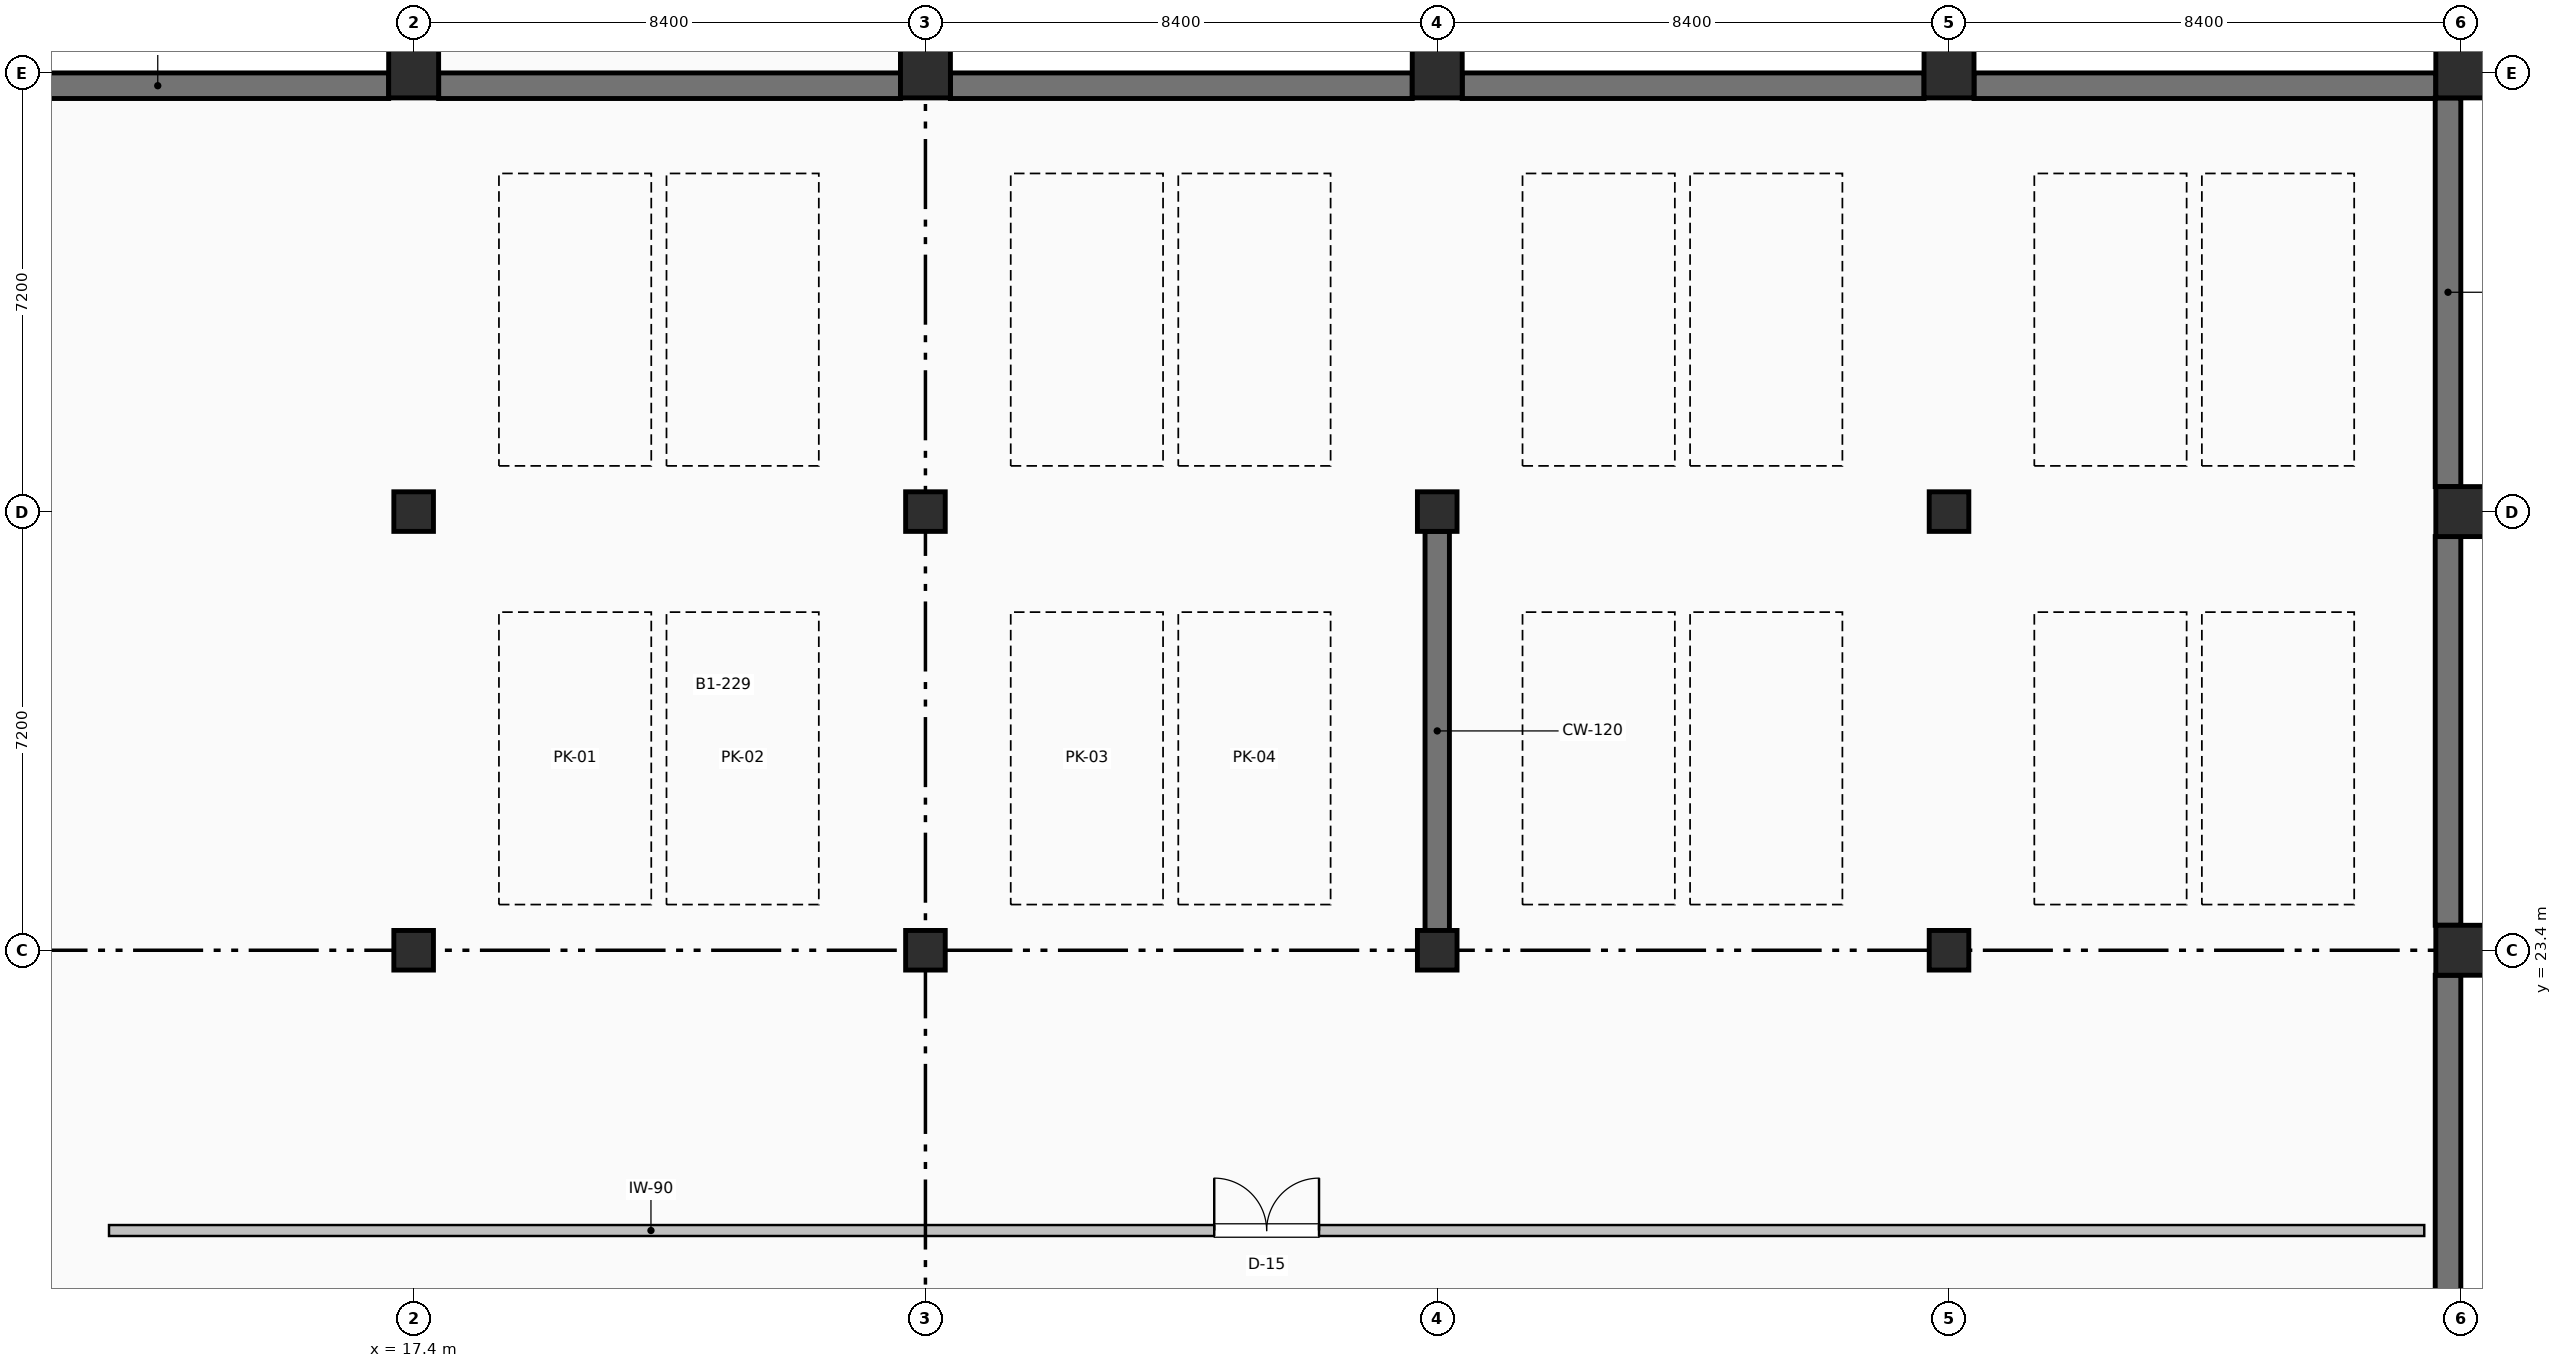
"""IFC4 building model, lengths in metres.
Left out: names, types, materials, properties, quantities, classifications, styles, units other than length and angle.
Written with IfcOpenShell. Run it as: python <this file> out.ifc"""

import sys

from ifc_helpers import new_model, si_unit, direction, frame, frame_2d, origin, origin_2d, place, context, subcontext, project, spatial, rectangle, extrude, element, fill, save


model = new_model("IFC4")
c1 = context("Model", 3, precision=1e-05, world=origin(), true_north=direction((0.0, 1.0)))
c2 = subcontext(c1, "Body", "Model", "MODEL_VIEW")
j1 = project(units=[si_unit("LENGTHUNIT", "METRE"), si_unit("PLANEANGLEUNIT", "RADIAN")], contexts=[c1])
p1 = place(None, origin())
s1 = spatial("IfcSite", under=j1, at=p1, CompositionType="ELEMENT")
p2 = place(p1, origin())
s2 = spatial("IfcBuilding", under=s1, at=p2, CompositionType="ELEMENT")
p3 = place(p2, frame((0.0, 0.0, -4.8)))
s3 = spatial("IfcBuildingStorey", under=s2, at=p3, CompositionType="ELEMENT", Elevation=-4.8)
for number, where, z_axis, x_axis in (
    (1, (17.4, 23.4, 0.0), (0.0, 0.0, 1.0), (1.0, 0.0, 0.0)),
    (2, (17.4, 30.6, 0.0), (0.0, 0.0, 1.0), (1.0, 0.0, 0.0)),
):
    element("IfcColumn", number, at=place(p3, frame(where, z_axis=z_axis, x_axis=x_axis)), inside=s3, PredefinedType="COLUMN", context=c2, shape_type="SweptSolid", body=[
        extrude(rectangle(XDim=0.65, YDim=0.65, at=origin_2d()), origin(), (0.0, 0.0, 1.0), 4.8),
    ])
p4 = place(p3, frame((17.4, 37.8, 0.0), z_axis=(0.0, 0.0, 1.0), x_axis=(1.0, 0.0, 0.0)))
e3 = element("IfcColumn", 3, at=p4, inside=s3, PredefinedType="COLUMN", context=c2, shape_type="SweptSolid", body=[
    extrude(rectangle(XDim=0.82, YDim=0.82, at=origin_2d()), origin(), (0.0, 0.0, 1.0), 4.8),
])
for number, where, z_axis, x_axis in (
    (4, (25.8, 23.4, 0.0), (0.0, 0.0, 1.0), (1.0, 0.0, 0.0)),
    (5, (25.8, 30.6, 0.0), (0.0, 0.0, 1.0), (1.0, 0.0, 0.0)),
):
    element("IfcColumn", number, at=place(p3, frame(where, z_axis=z_axis, x_axis=x_axis)), inside=s3, PredefinedType="COLUMN", context=c2, shape_type="SweptSolid", body=[
        extrude(rectangle(XDim=0.65, YDim=0.65, at=origin_2d()), origin(), (0.0, 0.0, 1.0), 4.8),
    ])
p5 = place(p3, frame((25.8, 37.8, 0.0), z_axis=(0.0, 0.0, 1.0), x_axis=(1.0, 0.0, 0.0)))
e6 = element("IfcColumn", 6, at=p5, inside=s3, PredefinedType="COLUMN", context=c2, shape_type="SweptSolid", body=[
    extrude(rectangle(XDim=0.82, YDim=0.82, at=origin_2d()), origin(), (0.0, 0.0, 1.0), 4.8),
])
for number, where, z_axis, x_axis in (
    (7, (34.2, 23.4, 0.0), (0.0, 0.0, 1.0), (1.0, 0.0, 0.0)),
    (8, (34.2, 30.6, 0.0), (0.0, 0.0, 1.0), (1.0, 0.0, 0.0)),
):
    element("IfcColumn", number, at=place(p3, frame(where, z_axis=z_axis, x_axis=x_axis)), inside=s3, PredefinedType="COLUMN", context=c2, shape_type="SweptSolid", body=[
        extrude(rectangle(XDim=0.65, YDim=0.65, at=origin_2d()), origin(), (0.0, 0.0, 1.0), 4.8),
    ])
p6 = place(p3, frame((34.2, 37.8, 0.0), z_axis=(0.0, 0.0, 1.0), x_axis=(1.0, 0.0, 0.0)))
e9 = element("IfcColumn", 9, at=p6, inside=s3, PredefinedType="COLUMN", context=c2, shape_type="SweptSolid", body=[
    extrude(rectangle(XDim=0.82, YDim=0.82, at=origin_2d()), origin(), (0.0, 0.0, 1.0), 4.8),
])
for number, where, z_axis, x_axis in (
    (10, (42.6, 23.4, 0.0), (0.0, 0.0, 1.0), (1.0, 0.0, 0.0)),
    (11, (42.6, 30.6, 0.0), (0.0, 0.0, 1.0), (1.0, 0.0, 0.0)),
):
    element("IfcColumn", number, at=place(p3, frame(where, z_axis=z_axis, x_axis=x_axis)), inside=s3, PredefinedType="COLUMN", context=c2, shape_type="SweptSolid", body=[
        extrude(rectangle(XDim=0.65, YDim=0.65, at=origin_2d()), origin(), (0.0, 0.0, 1.0), 4.8),
    ])
for number, where, z_axis, x_axis in (
    (12, (42.6, 37.8, 0.0), (0.0, 0.0, 1.0), (1.0, 0.0, 0.0)),
    (13, (51.0, 23.4, 0.0), (0.0, 0.0, 1.0), (1.0, 0.0, 0.0)),
    (14, (51.0, 30.6, 0.0), (0.0, 0.0, 1.0), (1.0, 0.0, 0.0)),
    (15, (51.0, 37.8, 0.0), (0.0, 0.0, 1.0), (1.0, 0.0, 0.0)),
):
    element("IfcColumn", number, at=place(p3, frame(where, z_axis=z_axis, x_axis=x_axis)), inside=s3, PredefinedType="COLUMN", context=c2, shape_type="SweptSolid", body=[
        extrude(rectangle(XDim=0.82, YDim=0.82, at=origin_2d()), origin(), (0.0, 0.0, 1.0), 4.8),
    ])
p7 = place(p3, frame((34.2, 23.725, 0.0), z_axis=(0.0, 0.0, 1.0), x_axis=(0.0, 1.0, 0.0)))
e16 = element("IfcWall", 16, at=p7, inside=s3, PredefinedType="SHEAR", context=c2, shape_type="SweptSolid", body=[
    extrude(rectangle(XDim=6.55, YDim=0.4, at=frame_2d((3.275, 0.0))), origin(), (0.0, 0.0, 1.0), 4.48),
])
p8 = place(p3, frame((9.41, 37.59, 0.0), z_axis=(0.0, 0.0, 1.0), x_axis=(1.0, 0.0, 0.0)))
e17 = element("IfcWall", 17, at=p8, inside=s3, PredefinedType="SHEAR", context=c2, shape_type="SweptSolid", body=[
    extrude(rectangle(XDim=7.58, YDim=0.42, at=frame_2d((3.79, 0.0))), origin(), (0.0, 0.0, 1.0), 4.5),
])
p9 = place(p3, frame((17.81, 37.59, 0.0), z_axis=(0.0, 0.0, 1.0), x_axis=(1.0, 0.0, 0.0)))
e18 = element("IfcWall", 18, at=p9, inside=s3, PredefinedType="SHEAR", context=c2, shape_type="SweptSolid", body=[
    extrude(rectangle(XDim=7.58, YDim=0.42, at=frame_2d((3.79, 0.0))), origin(), (0.0, 0.0, 1.0), 4.5),
])
p10 = place(p3, frame((26.21, 37.59, 0.0), z_axis=(0.0, 0.0, 1.0), x_axis=(1.0, 0.0, 0.0)))
e19 = element("IfcWall", 19, at=p10, inside=s3, PredefinedType="SHEAR", context=c2, shape_type="SweptSolid", body=[
    extrude(rectangle(XDim=7.58, YDim=0.42, at=frame_2d((3.79, 0.0))), origin(), (0.0, 0.0, 1.0), 4.5),
])
p11 = place(p3, frame((34.61, 37.59, 0.0), z_axis=(0.0, 0.0, 1.0), x_axis=(1.0, 0.0, 0.0)))
e20 = element("IfcWall", 20, at=p11, inside=s3, PredefinedType="SHEAR", context=c2, shape_type="SweptSolid", body=[
    extrude(rectangle(XDim=7.58, YDim=0.42, at=frame_2d((3.79, 0.0))), origin(), (0.0, 0.0, 1.0), 4.5),
])
p12 = place(p3, frame((43.01, 37.59, 0.0), z_axis=(0.0, 0.0, 1.0), x_axis=(1.0, 0.0, 0.0)))
e21 = element("IfcWall", 21, at=p12, inside=s3, PredefinedType="SHEAR", context=c2, shape_type="SweptSolid", body=[
    extrude(rectangle(XDim=7.58, YDim=0.42, at=frame_2d((3.79, 0.0))), origin(), (0.0, 0.0, 1.0), 4.5),
])
for number, where, z_axis, x_axis in (
    (22, (50.79, 37.39, 0.0), (0.0, 0.0, 1.0), (0.0, -1.0, 0.0)),
    (23, (50.79, 30.19, 0.0), (0.0, 0.0, 1.0), (0.0, -1.0, 0.0)),
    (24, (50.79, 22.99, 0.0), (0.0, 0.0, 1.0), (0.0, -1.0, 0.0)),
):
    element("IfcWall", number, at=place(p3, frame(where, z_axis=z_axis, x_axis=x_axis)), inside=s3, PredefinedType="SHEAR", context=c2, shape_type="SweptSolid", body=[
        extrude(rectangle(XDim=6.38, YDim=0.42, at=frame_2d((3.19, 0.0))), origin(), (0.0, 0.0, 1.0), 4.5),
    ])
p13 = place(p3, frame((12.4, 18.8, 0.0), z_axis=(0.0, 0.0, 1.0), x_axis=(1.0, 0.0, 0.0)))
e25 = element("IfcWall", 25, at=p13, inside=s3, PredefinedType="PARTITIONING", context=c2, shape_type="SweptSolid", body=[
    extrude(rectangle(XDim=38.0, YDim=0.18, at=frame_2d((19.0, 0.0))), origin(), (0.0, 0.0, 1.0), 4.492),
])
p14 = place(p13, frame((18.14, 0.0, 0.0)))
e26 = element("IfcOpeningElement", 26, at=p14, cuts=e25, PredefinedType="OPENING", context=c2, shape_type="SweptSolid", body=[
    extrude(rectangle(XDim=1.72, YDim=2.22, at=frame_2d((0.86, 1.11))), frame((0.0, 0.1, 0.0), z_axis=(0.0, -1.0, 0.0), x_axis=(1.0, 0.0, 0.0)), (0.0, 0.0, 1.0), 0.2),
])
p15 = place(p14, origin())
e27 = element("IfcDoor", 27, at=p15, inside=s3, OperationType="DOUBLE_DOOR_SINGLE_SWING", PredefinedType="DOOR", context=c2, shape_type="SweptSolid", body=[
    extrude(rectangle(XDim=1.72, YDim=2.22, at=frame_2d((0.86, 1.11))), frame((0.0, 0.025, 0.0), z_axis=(0.0, -1.0, 0.0), x_axis=(1.0, 0.0, 0.0)), (0.0, 0.0, 1.0), 0.05),
])
fill(e26, e27)
save(model, sys.argv[1])
